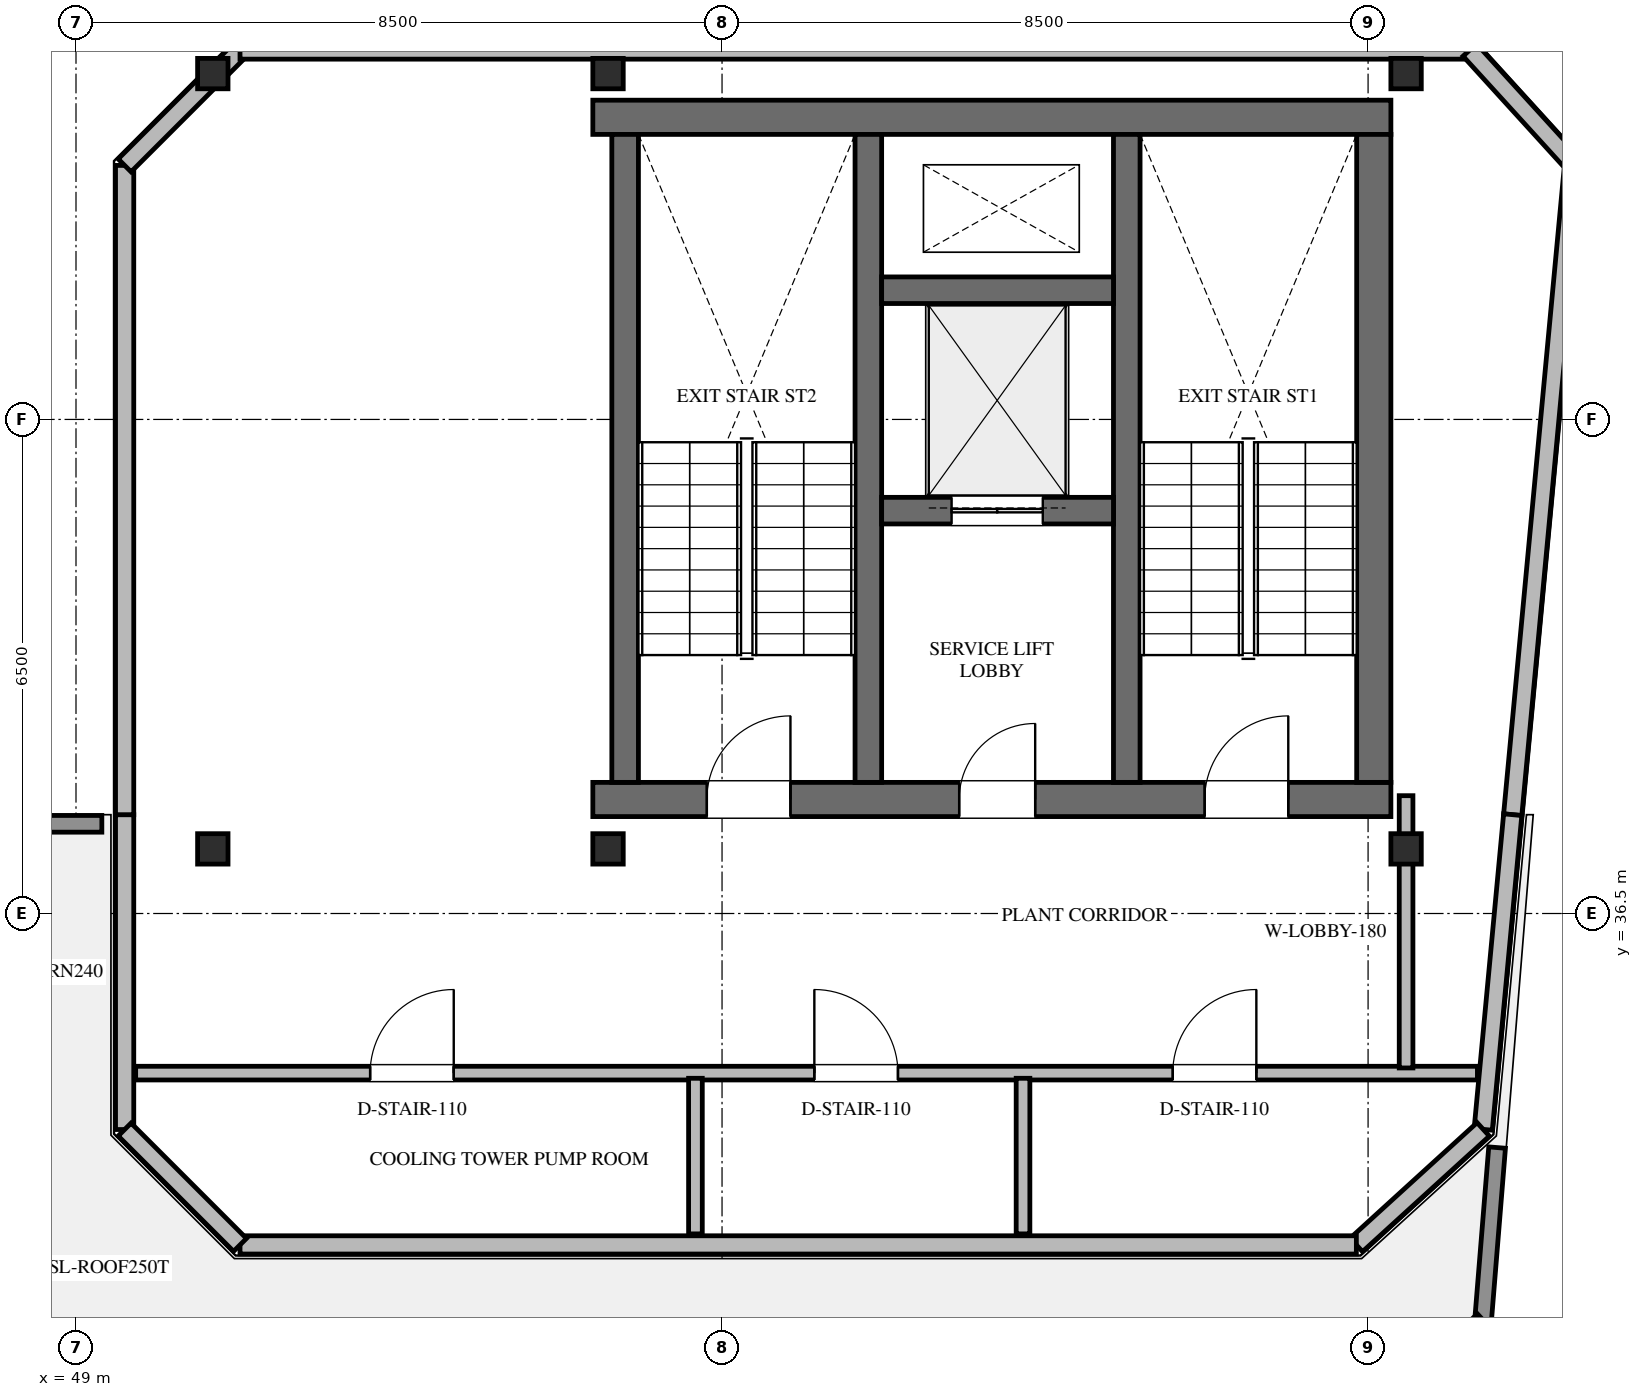
"""IFC4 building model, lengths in metres.
Left out: names, types, materials, properties, quantities, classifications, styles, units other than length and angle.
Written with IfcOpenShell. Run it as: python <this file> out.ifc"""

import sys

from ifc_helpers import new_model, si_unit, direction, frame, frame_2d, origin, origin_2d, place, context, subcontext, project, spatial, rectangle, hollow_rectangle, extrude, element, fill, save


model = new_model("IFC4")
c1 = context("Model", 3, precision=1e-05, world=origin(), true_north=direction((0.0, 1.0)))
c2 = subcontext(c1, "Body", "Model", "MODEL_VIEW")
j1 = project(units=[si_unit("LENGTHUNIT", "METRE"), si_unit("PLANEANGLEUNIT", "RADIAN")], contexts=[c1])
p1 = place(None, origin())
s1 = spatial("IfcSite", under=j1, at=p1, CompositionType="ELEMENT")
p2 = place(p1, origin())
s2 = spatial("IfcBuilding", under=s1, at=p2, CompositionType="ELEMENT")
p3 = place(p2, frame((0.0, 0.0, 330.0)))
s3 = spatial("IfcBuildingStorey", under=s2, at=p3, CompositionType="ELEMENT", Elevation=330.0)
p4 = place(p3, frame((55.8, 46.975, 0.0), z_axis=(0.0, 0.0, 1.0), x_axis=(1.0, 0.0, 0.0)))
e1 = element("IfcWall", 1, at=p4, inside=s3, PredefinedType="SHEAR", context=c2, shape_type="SweptSolid", body=[
    extrude(rectangle(XDim=10.5, YDim=0.45, at=frame_2d((5.25, 0.0))), origin(), (0.0, 0.0, 1.0), 3.6),
])
p5 = place(p3, frame((55.8, 38.0, 0.0), z_axis=(0.0, 0.0, 1.0), x_axis=(1.0, 0.0, 0.0)))
e2 = element("IfcWall", 2, at=p5, inside=s3, PredefinedType="SHEAR", context=c2, shape_type="SweptSolid", body=[
    extrude(rectangle(XDim=10.5, YDim=0.45, at=frame_2d((5.25, 0.0))), origin(), (0.0, 0.0, 1.0), 3.6),
])
p6 = place(p5, frame((1.5, 0.0, 0.0)))
e3 = element("IfcOpeningElement", 3, at=p6, cuts=e2, PredefinedType="OPENING", context=c2, shape_type="SweptSolid", body=[
    extrude(rectangle(XDim=1.1, YDim=2.2, at=frame_2d((0.55, 1.1))), frame((0.0, 0.235, 0.0), z_axis=(0.0, -1.0, 0.0), x_axis=(1.0, 0.0, 0.0)), (0.0, 0.0, 1.0), 0.47),
])
p7 = place(p5, frame((4.82, 0.0, 0.0)))
e4 = element("IfcOpeningElement", 4, at=p7, cuts=e2, PredefinedType="OPENING", context=c2, shape_type="SweptSolid", body=[
    extrude(rectangle(XDim=1.0, YDim=2.15, at=frame_2d((0.5, 1.075))), frame((0.0, 0.235, 0.0), z_axis=(0.0, -1.0, 0.0), x_axis=(1.0, 0.0, 0.0)), (0.0, 0.0, 1.0), 0.47),
])
p8 = place(p5, frame((8.05, 0.0, 0.0)))
e5 = element("IfcOpeningElement", 5, at=p8, cuts=e2, PredefinedType="OPENING", context=c2, shape_type="SweptSolid", body=[
    extrude(rectangle(XDim=1.1, YDim=2.2, at=frame_2d((0.55, 1.1))), frame((0.0, 0.235, 0.0), z_axis=(0.0, -1.0, 0.0), x_axis=(1.0, 0.0, 0.0)), (0.0, 0.0, 1.0), 0.47),
])
p9 = place(p3, frame((66.075, 38.225, 0.0), z_axis=(0.0, 0.0, 1.0), x_axis=(0.0, 1.0, 0.0)))
e6 = element("IfcWall", 6, at=p9, inside=s3, PredefinedType="SHEAR", context=c2, shape_type="SweptSolid", body=[
    extrude(rectangle(XDim=8.525, YDim=0.45, at=frame_2d((4.262, 0.0))), origin(), (0.0, 0.0, 1.0), 3.6),
])
for number, where, z_axis, x_axis in (
    (7, (62.825, 38.225, 0.0), (0.0, 0.0, 1.0), (0.0, 1.0, 0.0)),
    (8, (59.425, 38.225, 0.0), (0.0, 0.0, 1.0), (0.0, 1.0, 0.0)),
    (9, (56.225, 38.225, 0.0), (0.0, 0.0, 1.0), (0.0, 1.0, 0.0)),
):
    element("IfcWall", number, at=place(p3, frame(where, z_axis=z_axis, x_axis=x_axis)), inside=s3, PredefinedType="SHEAR", context=c2, shape_type="SweptSolid", body=[
        extrude(rectangle(XDim=8.525, YDim=0.35, at=frame_2d((4.262, 0.0))), origin(), (0.0, 0.0, 1.0), 3.6),
    ])
p10 = place(p3, frame((59.6, 41.8, 0.0), z_axis=(0.0, 0.0, 1.0), x_axis=(1.0, 0.0, 0.0)))
e10 = element("IfcWall", 10, at=p10, inside=s3, PredefinedType="SHEAR", context=c2, shape_type="SweptSolid", body=[
    extrude(rectangle(XDim=3.05, YDim=0.35, at=frame_2d((1.525, 0.0))), origin(), (0.0, 0.0, 1.0), 3.6),
])
p11 = place(p10, frame((0.92, 0.0, 0.0)))
e11 = element("IfcOpeningElement", 11, at=p11, cuts=e10, PredefinedType="OPENING", context=c2, shape_type="SweptSolid", body=[
    extrude(rectangle(XDim=1.2, YDim=2.2, at=frame_2d((0.6, 1.1))), frame((0.0, 0.185, 0.0), z_axis=(0.0, -1.0, 0.0), x_axis=(1.0, 0.0, 0.0)), (0.0, 0.0, 1.0), 0.37),
])
p12 = place(p3, frame((59.6, 44.7, 0.0), z_axis=(0.0, 0.0, 1.0), x_axis=(1.0, 0.0, 0.0)))
e12 = element("IfcWall", 12, at=p12, inside=s3, PredefinedType="SHEAR", context=c2, shape_type="SweptSolid", body=[
    extrude(rectangle(XDim=3.05, YDim=0.35, at=frame_2d((1.525, 0.0))), origin(), (0.0, 0.0, 1.0), 3.6),
])
for number, where, z_axis, x_axis in (
    (13, (66.5, 47.55, 0.0), (0.0, 0.0, 1.0), (1.0, 0.0, 0.0)),
    (14, (56.0, 47.55, 0.0), (0.0, 0.0, 1.0), (1.0, 0.0, 0.0)),
    (15, (66.5, 37.35, 0.0), (0.0, 0.0, 1.0), (1.0, 0.0, 0.0)),
    (16, (56.0, 37.35, 0.0), (0.0, 0.0, 1.0), (1.0, 0.0, 0.0)),
    (17, (50.8, 47.55, 0.0), (0.0, 0.0, 1.0), (1.0, 0.0, 0.0)),
    (18, (50.8, 37.35, 0.0), (0.0, 0.0, 1.0), (1.0, 0.0, 0.0)),
):
    element("IfcColumn", number, at=place(p3, frame(where, z_axis=z_axis, x_axis=x_axis)), inside=s3, PredefinedType="COLUMN", context=c2, shape_type="SweptSolid", body=[
        extrude(hollow_rectangle(XDim=0.4, YDim=0.4, WallThickness=0.016, at=origin_2d()), origin(), (0.0, 0.0, 1.0), 3.6),
    ])
p13 = place(p3, frame((48.65, 29.62, 0.0), z_axis=(0.0, 0.0, 1.0), x_axis=(-0.707106781187, 0.707106781187, 0.0)))
e19 = element("IfcWall", 19, at=p13, inside=s3, PredefinedType="PARAPET", context=c2, shape_type="SweptSolid", body=[
    extrude(rectangle(XDim=2.163, YDim=0.22, at=frame_2d((1.082, 0.0))), origin(), (0.0, 0.0, 1.0), 1.2),
])
p14 = place(p3, frame((47.12, 37.68, 0.0), z_axis=(0.0, 0.0, 1.0), x_axis=(1.0, 0.0, 0.0)))
e20 = element("IfcWall", 20, at=p14, inside=s3, PredefinedType="PARAPET", context=c2, shape_type="SweptSolid", body=[
    extrude(rectangle(XDim=2.22, YDim=0.22, at=frame_2d((1.11, 0.0))), origin(), (0.0, 0.0, 1.0), 1.2),
])
p15 = place(p3, frame((67.698, 33.42, 0.0), z_axis=(0.0, 0.0, 1.0), x_axis=(-0.080853298919, -0.99672601253, 0.0)))
e21 = element("IfcWall", 21, at=p15, inside=s3, PredefinedType="PARAPET", context=c2, shape_type="SweptSolid", body=[
    extrude(rectangle(XDim=2.277, YDim=0.22, at=frame_2d((1.138, 0.0))), origin(), (0.0, 0.0, 1.0), 1.2),
])
p16 = place(p3, frame((67.513, 31.151, 0.0), z_axis=(0.0, 0.0, 1.0), x_axis=(-0.735172180392, -0.677880421002, 0.0)))
e22 = element("IfcWall", 22, at=p16, inside=s3, PredefinedType="PARAPET", context=c2, shape_type="SweptSolid", body=[
    extrude(rectangle(XDim=2.259, YDim=0.22, at=frame_2d((1.129, 0.0))), origin(), (0.0, 0.0, 1.0), 1.2),
])
p17 = place(p3, frame((49.64, 33.658, 0.0), z_axis=(0.0, 0.0, 1.0), x_axis=(0.0, 1.0, 0.0)))
e23 = element("IfcWall", 23, at=p17, inside=s3, PredefinedType="STANDARD", context=c2, shape_type="SweptSolid", body=[
    extrude(rectangle(XDim=4.142, YDim=0.24, at=frame_2d((2.071, 0.0))), origin(), (0.0, 0.0, 1.0), 3.32),
])
p18 = place(p3, frame((49.64, 37.8, 0.0), z_axis=(0.0, 0.0, 1.0), x_axis=(0.0, 1.0, 0.0)))
e24 = element("IfcWall", 24, at=p18, inside=s3, PredefinedType="STANDARD", context=c2, shape_type="SweptSolid", body=[
    extrude(rectangle(XDim=8.542, YDim=0.24, at=frame_2d((4.271, 0.0))), origin(), (0.0, 0.0, 1.0), 3.32),
])
p19 = place(p3, frame((49.64, 46.342, 0.0), z_axis=(0.0, 0.0, 1.0), x_axis=(0.707106781187, 0.707106781187, 0.0)))
e25 = element("IfcWall", 25, at=p19, inside=s3, PredefinedType="STANDARD", context=c2, shape_type="SweptSolid", body=[
    extrude(rectangle(XDim=2.147, YDim=0.24, at=frame_2d((1.073, 0.0))), origin(), (0.0, 0.0, 1.0), 2.709),
])
p20 = place(p3, frame((51.158, 47.86, 0.0), z_axis=(0.0, 0.0, 1.0), x_axis=(1.0, 0.0, 0.0)))
e26 = element("IfcWall", 26, at=p20, inside=s3, PredefinedType="STANDARD", context=c2, shape_type="SweptSolid", body=[
    extrude(rectangle(XDim=16.18, YDim=0.24, at=frame_2d((8.09, 0.0))), origin(), (0.0, 0.0, 1.0), 3.32),
])
p21 = place(p3, frame((67.338, 47.86, 0.0), z_axis=(0.0, 0.0, 1.0), x_axis=(0.673276865928, -0.739390466402, 0.0)))
e27 = element("IfcWall", 27, at=p21, inside=s3, PredefinedType="STANDARD", context=c2, shape_type="SweptSolid", body=[
    extrude(rectangle(XDim=2.031, YDim=0.24, at=frame_2d((1.016, 0.0))), origin(), (0.0, 0.0, 1.0), 3.32),
])
p22 = place(p3, frame((68.706, 46.358, 0.0), z_axis=(0.0, 0.0, 1.0), x_axis=(-0.093357425452, -0.995632658722, 0.0)))
e28 = element("IfcWall", 28, at=p22, inside=s3, PredefinedType="STANDARD", context=c2, shape_type="SweptSolid", body=[
    extrude(rectangle(XDim=8.596, YDim=0.24, at=frame_2d((4.298, 0.0))), origin(), (0.0, 0.0, 1.0), 3.32),
])
p23 = place(p3, frame((67.903, 37.8, 0.0), z_axis=(0.0, 0.0, 1.0), x_axis=(-0.093351621222, -0.995633202949, 0.0)))
e29 = element("IfcWall", 29, at=p23, inside=s3, PredefinedType="STANDARD", context=c2, shape_type="SweptSolid", body=[
    extrude(rectangle(XDim=4.158, YDim=0.24, at=frame_2d((2.079, 0.0))), origin(), (0.0, 0.0, 1.0), 3.32),
])
p24 = place(p3, frame((67.515, 33.66, 0.0), z_axis=(0.0, 0.0, 1.0), x_axis=(-0.739372182695, -0.673296944488, 0.0)))
e30 = element("IfcWall", 30, at=p24, inside=s3, PredefinedType="STANDARD", context=c2, shape_type="SweptSolid", body=[
    extrude(rectangle(XDim=2.258, YDim=0.24, at=frame_2d((1.129, 0.0))), origin(), (0.0, 0.0, 1.0), 3.32),
])
p25 = place(p3, frame((65.846, 32.14, 0.0), z_axis=(0.0, 0.0, 1.0), x_axis=(-1.0, 0.0, 0.0)))
e31 = element("IfcWall", 31, at=p25, inside=s3, PredefinedType="STANDARD", context=c2, shape_type="SweptSolid", body=[
    extrude(rectangle(XDim=14.688, YDim=0.24, at=frame_2d((7.344, 0.0))), origin(), (0.0, 0.0, 1.0), 3.32),
])
p26 = place(p3, frame((51.158, 32.14, 0.0), z_axis=(0.0, 0.0, 1.0), x_axis=(-0.707106781187, 0.707106781187, 0.0)))
e32 = element("IfcWall", 32, at=p26, inside=s3, PredefinedType="STANDARD", context=c2, shape_type="SweptSolid", body=[
    extrude(rectangle(XDim=2.147, YDim=0.24, at=frame_2d((1.073, 0.0))), origin(), (0.0, 0.0, 1.0), 3.32),
])
p27 = place(p3, frame((49.785, 34.4, 0.0), z_axis=(0.0, 0.0, 1.0), x_axis=(1.0, 0.0, 0.0)))
e33 = element("IfcWall", 33, at=p27, inside=s3, PredefinedType="STANDARD", context=c2, shape_type="SweptSolid", body=[
    extrude(rectangle(XDim=17.654, YDim=0.18, at=frame_2d((8.827, 0.0))), origin(), (0.0, 0.0, 1.0), 3.32),
])
p28 = place(p27, frame((3.085, 0.0, 0.0)))
e34 = element("IfcOpeningElement", 34, at=p28, cuts=e33, PredefinedType="OPENING", context=c2, shape_type="SweptSolid", body=[
    extrude(rectangle(XDim=1.1, YDim=2.2, at=frame_2d((0.55, 1.1))), frame((0.0, 0.1, 0.0), z_axis=(0.0, -1.0, 0.0), x_axis=(1.0, 0.0, 0.0)), (0.0, 0.0, 1.0), 0.2),
])
p29 = place(p27, frame((8.929, 0.0, 0.0)))
e35 = element("IfcOpeningElement", 35, at=p29, cuts=e33, PredefinedType="OPENING", context=c2, shape_type="SweptSolid", body=[
    extrude(rectangle(XDim=1.1, YDim=2.2, at=frame_2d((0.55, 1.1))), frame((0.0, 0.1, 0.0), z_axis=(0.0, -1.0, 0.0), x_axis=(1.0, 0.0, 0.0)), (0.0, 0.0, 1.0), 0.2),
])
p30 = place(p27, frame((13.645, 0.0, 0.0)))
e36 = element("IfcOpeningElement", 36, at=p30, cuts=e33, PredefinedType="OPENING", context=c2, shape_type="SweptSolid", body=[
    extrude(rectangle(XDim=1.1, YDim=2.2, at=frame_2d((0.55, 1.1))), frame((0.0, 0.1, 0.0), z_axis=(0.0, -1.0, 0.0), x_axis=(1.0, 0.0, 0.0)), (0.0, 0.0, 1.0), 0.2),
])
p31 = place(p3, frame((66.5, 34.468, 0.0), z_axis=(0.0, 0.0, 1.0), x_axis=(0.0, 1.0, 0.0)))
e37 = element("IfcWall", 37, at=p31, inside=s3, PredefinedType="STANDARD", context=c2, shape_type="SweptSolid", body=[
    extrude(rectangle(XDim=3.582, YDim=0.18, at=frame_2d((1.791, 0.0))), origin(), (0.0, 0.0, 1.0), 2.709),
])
for number, where, z_axis, x_axis in (
    (38, (57.15, 32.285, 0.0), (0.0, 0.0, 1.0), (0.0, 1.0, 0.0)),
    (39, (61.46, 32.285, 0.0), (0.0, 0.0, 1.0), (0.0, 1.0, 0.0)),
):
    element("IfcWall", number, at=place(p3, frame(where, z_axis=z_axis, x_axis=x_axis)), inside=s3, PredefinedType="STANDARD", context=c2, shape_type="SweptSolid", body=[
        extrude(rectangle(XDim=2.047, YDim=0.18, at=frame_2d((1.023, 0.0))), origin(), (0.0, 0.0, 1.0), 3.32),
    ])
p32 = place(p6, origin())
e40 = element("IfcDoor", 40, at=p32, inside=s3, OperationType="SINGLE_SWING_RIGHT", PredefinedType="DOOR", context=c2, shape_type="SweptSolid", body=[
    extrude(rectangle(XDim=1.1, YDim=2.2, at=frame_2d((0.55, 1.1))), frame((0.0, 0.025, 0.0), z_axis=(0.0, -1.0, 0.0), x_axis=(1.0, 0.0, 0.0)), (0.0, 0.0, 1.0), 0.05),
])
fill(e3, e40)
p33 = place(p7, origin())
e41 = element("IfcDoor", 41, at=p33, inside=s3, OperationType="SINGLE_SWING_RIGHT", PredefinedType="DOOR", context=c2, shape_type="SweptSolid", body=[
    extrude(rectangle(XDim=1.0, YDim=2.15, at=frame_2d((0.5, 1.075))), frame((0.0, 0.025, 0.0), z_axis=(0.0, -1.0, 0.0), x_axis=(1.0, 0.0, 0.0)), (0.0, 0.0, 1.0), 0.05),
])
fill(e4, e41)
p34 = place(p8, origin())
e42 = element("IfcDoor", 42, at=p34, inside=s3, OperationType="SINGLE_SWING_RIGHT", PredefinedType="DOOR", context=c2, shape_type="SweptSolid", body=[
    extrude(rectangle(XDim=1.1, YDim=2.2, at=frame_2d((0.55, 1.1))), frame((0.0, 0.025, 0.0), z_axis=(0.0, -1.0, 0.0), x_axis=(1.0, 0.0, 0.0)), (0.0, 0.0, 1.0), 0.05),
])
fill(e5, e42)
p35 = place(p11, origin())
e43 = element("IfcDoor", 43, at=p35, inside=s3, OperationType="DOUBLE_DOOR_SLIDING", PredefinedType="DOOR", context=c2, shape_type="SweptSolid", body=[
    extrude(rectangle(XDim=1.2, YDim=2.2, at=frame_2d((0.6, 1.1))), frame((0.0, 0.025, 0.0), z_axis=(0.0, -1.0, 0.0), x_axis=(1.0, 0.0, 0.0)), (0.0, 0.0, 1.0), 0.05),
])
fill(e11, e43)
p36 = place(p28, origin())
e44 = element("IfcDoor", 44, at=p36, inside=s3, OperationType="SINGLE_SWING_RIGHT", PredefinedType="DOOR", context=c2, shape_type="SweptSolid", body=[
    extrude(rectangle(XDim=1.1, YDim=2.2, at=frame_2d((0.55, 1.1))), frame((0.0, 0.025, 0.0), z_axis=(0.0, -1.0, 0.0), x_axis=(1.0, 0.0, 0.0)), (0.0, 0.0, 1.0), 0.05),
])
fill(e34, e44)
p37 = place(p29, origin())
e45 = element("IfcDoor", 45, at=p37, inside=s3, OperationType="SINGLE_SWING_LEFT", PredefinedType="DOOR", context=c2, shape_type="SweptSolid", body=[
    extrude(rectangle(XDim=1.1, YDim=2.2, at=frame_2d((0.55, 1.1))), frame((0.0, 0.025, 0.0), z_axis=(0.0, -1.0, 0.0), x_axis=(1.0, 0.0, 0.0)), (0.0, 0.0, 1.0), 0.05),
])
fill(e35, e45)
p38 = place(p30, origin())
e46 = element("IfcDoor", 46, at=p38, inside=s3, OperationType="SINGLE_SWING_RIGHT", PredefinedType="DOOR", context=c2, shape_type="SweptSolid", body=[
    extrude(rectangle(XDim=1.1, YDim=2.2, at=frame_2d((0.55, 1.1))), frame((0.0, 0.025, 0.0), z_axis=(0.0, -1.0, 0.0), x_axis=(1.0, 0.0, 0.0)), (0.0, 0.0, 1.0), 0.05),
])
fill(e36, e46)
save(model, sys.argv[1])
